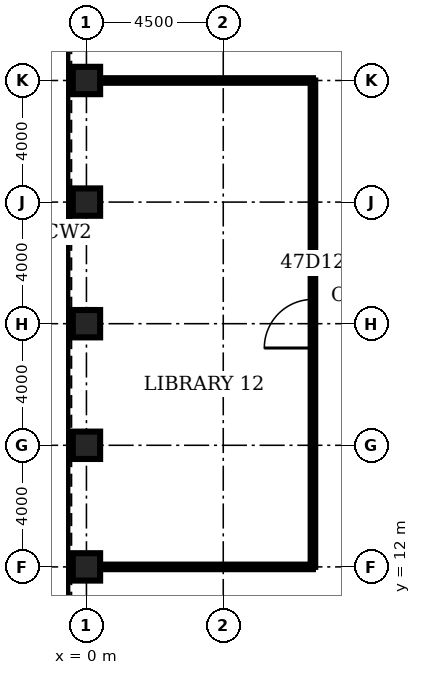
"""IFC4 building model, lengths in metres.
Left out: names, types, materials, properties, quantities, classifications, styles, units other than length and angle.
Written with IfcOpenShell. Run it as: python <this file> out.ifc"""

import sys

from ifc_helpers import new_model, si_unit, direction, frame, frame_2d, origin, origin_2d, place, context, subcontext, project, spatial, rectangle, hollow_rectangle, extrude, element, fill, save


model = new_model("IFC4")
c1 = context("Model", 3, precision=1e-05, world=origin(), true_north=direction((0.0, 1.0)))
c2 = subcontext(c1, "Body", "Model", "MODEL_VIEW")
j1 = project(units=[si_unit("LENGTHUNIT", "METRE"), si_unit("PLANEANGLEUNIT", "RADIAN")], contexts=[c1])
p1 = place(None, origin())
s1 = spatial("IfcSite", under=j1, at=p1, CompositionType="ELEMENT")
p2 = place(p1, origin())
s2 = spatial("IfcBuilding", under=s1, at=p2, CompositionType="ELEMENT")
p3 = place(p2, frame((0.0, 0.0, 211.0)))
s3 = spatial("IfcBuildingStorey", under=s2, at=p3, CompositionType="ELEMENT", Elevation=211.0)
for number, where, z_axis, x_axis in (
    (1, (0.0, 28.0, 0.0), (0.0, 0.0, 1.0), (1.0, 0.0, 0.0)),
    (2, (0.0, 24.0, 0.0), (0.0, 0.0, 1.0), (1.0, 0.0, 0.0)),
    (3, (0.0, 20.0, 0.0), (0.0, 0.0, 1.0), (1.0, 0.0, 0.0)),
    (4, (0.0, 16.0, 0.0), (0.0, 0.0, 1.0), (1.0, 0.0, 0.0)),
    (5, (0.0, 12.0, 0.0), (0.0, 0.0, 1.0), (1.0, 0.0, 0.0)),
):
    element("IfcColumn", number, at=place(p3, frame(where, z_axis=z_axis, x_axis=x_axis)), inside=s3, PredefinedType="COLUMN", context=c2, shape_type="SweptSolid", body=[
        extrude(hollow_rectangle(XDim=0.9, YDim=0.9, WallThickness=0.08, at=origin_2d()), origin(), (0.0, 0.0, 1.0), 4.2),
    ])
for number, where, z_axis, x_axis in (
    (6, (0.45, 12.0, 0.0), (0.0, 0.0, 1.0), (1.0, 0.0, 0.0)),
    (7, (0.45, 28.0, 0.0), (0.0, 0.0, 1.0), (1.0, 0.0, 0.0)),
):
    element("IfcWall", number, at=place(p3, frame(where, z_axis=z_axis, x_axis=x_axis)), inside=s3, PredefinedType="PARTITIONING", context=c2, shape_type="SweptSolid", body=[
        extrude(rectangle(XDim=7.0, YDim=0.15, at=frame_2d((3.5, 0.0))), origin(), (0.0, 0.0, 1.0), 3.0),
    ])
p4 = place(p3, frame((7.45, 12.0, 0.0), z_axis=(0.0, 0.0, 1.0), x_axis=(0.0, 1.0, 0.0)))
e8 = element("IfcWall", 8, at=p4, inside=s3, PredefinedType="PARTITIONING", context=c2, shape_type="SweptSolid", body=[
    extrude(rectangle(XDim=16.0, YDim=0.15, at=frame_2d((8.0, 0.0))), origin(), (0.0, 0.0, 1.0), 3.0),
])
p5 = place(p4, frame((7.2, 0.0, 0.0)))
e9 = element("IfcOpeningElement", 9, at=p5, cuts=e8, PredefinedType="OPENING", context=c2, shape_type="SweptSolid", body=[
    extrude(rectangle(XDim=1.6, YDim=2.1, at=frame_2d((0.8, 1.05))), frame((0.0, 0.085, 0.0), z_axis=(0.0, -1.0, 0.0), x_axis=(1.0, 0.0, 0.0)), (0.0, 0.0, 1.0), 0.17),
])
p6 = place(p5, origin())
e10 = element("IfcDoor", 10, at=p6, inside=s3, OperationType="SINGLE_SWING_LEFT", PredefinedType="DOOR", context=c2, shape_type="SweptSolid", body=[
    extrude(rectangle(XDim=1.6, YDim=2.1, at=frame_2d((0.8, 1.05))), frame((0.0, 0.025, 0.0), z_axis=(0.0, -1.0, 0.0), x_axis=(1.0, 0.0, 0.0)), (0.0, 0.0, 1.0), 0.05),
])
fill(e9, e10)
save(model, sys.argv[1])
